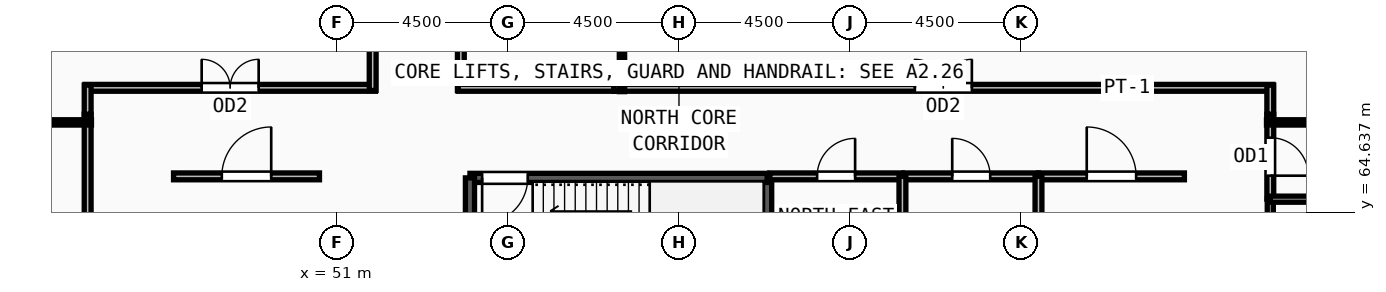
"""IFC4 building model, lengths in metres.
Left out: names, types, materials, properties, quantities, classifications, styles, units other than length and angle.
Written with IfcOpenShell. Run it as: python <this file> out.ifc"""

import sys

from ifc_helpers import new_model, si_unit, direction, frame, frame_2d, origin, place, context, subcontext, project, spatial, rectangle, extrude, source, transform, mapped, element, fill, save


model = new_model("IFC4")
c1 = context("Model", 3, precision=1e-05, world=origin(), true_north=direction((0.0, 1.0)))
c2 = subcontext(c1, "Body", "Model", "MODEL_VIEW")
j1 = project(units=[si_unit("LENGTHUNIT", "METRE"), si_unit("PLANEANGLEUNIT", "RADIAN")], contexts=[c1])
p1 = place(None, origin())
s1 = spatial("IfcSite", under=j1, at=p1, CompositionType="ELEMENT")
p2 = place(p1, origin())
s2 = spatial("IfcBuilding", under=s1, at=p2, CompositionType="ELEMENT")
p3 = place(p2, frame((0.0, 0.0, 339.75)))
s3 = spatial("IfcBuildingStorey", under=s2, at=p3, CompositionType="ELEMENT", Elevation=339.75)
p4 = place(p3, frame((62.32, 62.1, 0.0), z_axis=(0.0, 0.0, 1.0), x_axis=(0.0, 1.0, 0.0)))
e1 = element("IfcWall", 1, at=p4, inside=s3, PredefinedType="SOLIDWALL", context=c2, shape_type="SweptSolid", body=[
    extrude(rectangle(XDim=3.44, YDim=0.24, at=frame_2d((1.72, 0.0))), origin(), (0.0, 0.0, 1.0), 3.57),
])
p5 = place(p3, frame((62.32, 65.54, 0.0), z_axis=(0.0, 0.0, 1.0), x_axis=(-1.0, 0.0, 0.0)))
e2 = element("IfcWall", 2, at=p5, inside=s3, PredefinedType="SOLIDWALL", context=c2, shape_type="SweptSolid", body=[
    extrude(rectangle(XDim=7.82, YDim=0.24, at=frame_2d((3.91, 0.0))), origin(), (0.0, 0.0, 1.0), 3.57),
])
m1 = source(origin(), c2, "Body", "SweptSolid", [
    extrude(rectangle(XDim=1.2, YDim=2.2, at=frame_2d((0.6, 1.1))), frame((0.0, 0.13, 0.0), z_axis=(0.0, -1.0, 0.0), x_axis=(1.0, 0.0, 0.0)), (0.0, 0.0, 1.0), 0.26),
])
p6 = place(p5, frame((6.3, 0.0, 0.0)))
e3 = element("IfcOpeningElement", 3, at=p6, cuts=e2, PredefinedType="OPENING", context=c2, shape_type="MappedRepresentation", body=[
    mapped(m1, transform((0.0, 0.0, 0.0), x_axis=(1.0, 0.0, 0.0), y_axis=(0.0, 1.0, 0.0), z_axis=(0.0, 0.0, 1.0), scale=1.0)),
])
p7 = place(p3, frame((54.5, 65.54, 0.0), z_axis=(0.0, 0.0, 1.0), x_axis=(0.0, -1.0, 0.0)))
e4 = element("IfcWall", 4, at=p7, inside=s3, PredefinedType="SOLIDWALL", context=c2, shape_type="SweptSolid", body=[
    extrude(rectangle(XDim=3.44, YDim=0.24, at=frame_2d((1.72, 0.0))), origin(), (0.0, 0.0, 1.0), 3.57),
])
p8 = place(p3, frame((75.56, 62.24, 0.0), z_axis=(0.0, 0.0, 1.0), x_axis=(0.0, 1.0, 0.0)))
e5 = element("IfcWall", 5, at=p8, inside=s3, PredefinedType="PARTITIONING", context=c2, shape_type="SweptSolid", body=[
    extrude(rectangle(XDim=2.74, YDim=0.16, at=frame_2d((1.37, 0.0))), origin(), (0.0, 0.0, 1.0), 3.57),
])
m2 = source(origin(), c2, "Body", "SweptSolid", [
    extrude(rectangle(XDim=1.05, YDim=2.15, at=frame_2d((0.525, 1.075))), frame((0.0, 0.09, 0.0), z_axis=(0.0, -1.0, 0.0), x_axis=(1.0, 0.0, 0.0)), (0.0, 0.0, 1.0), 0.18),
])
p9 = place(p8, frame((0.845, 0.0, 0.0)))
e6 = element("IfcOpeningElement", 6, at=p9, cuts=e5, PredefinedType="OPENING", context=c2, shape_type="MappedRepresentation", body=[
    mapped(m2, transform((0.0, 0.0, 0.0), x_axis=(1.0, 0.0, 0.0), y_axis=(0.0, 1.0, 0.0), z_axis=(0.0, 0.0, 1.0), scale=1.0)),
])
p10 = place(p3, frame((62.39, 65.58, 0.0), z_axis=(0.0, 0.0, 1.0), x_axis=(1.0, 0.0, 0.0)))
e7 = element("IfcWall", 7, at=p10, inside=s3, PredefinedType="PARTITIONING", context=c2, shape_type="SweptSolid", body=[
    extrude(rectangle(XDim=3.49, YDim=0.18, at=frame_2d((1.745, 0.0))), origin(), (0.0, 0.0, 1.0), 3.57),
])
m3 = source(origin(), c2, "Body", "SweptSolid", [
    extrude(rectangle(XDim=1.0, YDim=2.2, at=frame_2d((0.5, 1.1))), frame((0.0, 0.1, 0.0), z_axis=(0.0, -1.0, 0.0), x_axis=(1.0, 0.0, 0.0)), (0.0, 0.0, 1.0), 0.2),
])
p11 = place(p10, frame((1.245, 0.0, 0.0)))
e8 = element("IfcOpeningElement", 8, at=p11, cuts=e7, PredefinedType="OPENING", context=c2, shape_type="MappedRepresentation", body=[
    mapped(m3, transform((0.0, 0.0, 0.0), x_axis=(1.0, 0.0, 0.0), y_axis=(0.0, 1.0, 0.0), z_axis=(0.0, 0.0, 1.0), scale=1.0)),
])
p12 = place(p3, frame((65.92, 65.58, 0.0), z_axis=(0.0, 0.0, 1.0), x_axis=(1.0, 0.0, 0.0)))
e9 = element("IfcWall", 9, at=p12, inside=s3, PredefinedType="PARTITIONING", context=c2, shape_type="SweptSolid", body=[
    extrude(rectangle(XDim=3.54, YDim=0.18, at=frame_2d((1.77, 0.0))), origin(), (0.0, 0.0, 1.0), 3.57),
])
p13 = place(p12, frame((1.27, 0.0, 0.0)))
e10 = element("IfcOpeningElement", 10, at=p13, cuts=e9, PredefinedType="OPENING", context=c2, shape_type="MappedRepresentation", body=[
    mapped(m3, transform((0.0, 0.0, 0.0), x_axis=(1.0, 0.0, 0.0), y_axis=(0.0, 1.0, 0.0), z_axis=(0.0, 0.0, 1.0), scale=1.0)),
])
p14 = place(p3, frame((46.7, 65.58, 0.0), z_axis=(0.0, 0.0, 1.0), x_axis=(1.0, 0.0, 0.0)))
e11 = element("IfcWall", 11, at=p14, inside=s3, PredefinedType="PARTITIONING", context=c2, shape_type="SweptSolid", body=[
    extrude(rectangle(XDim=3.84, YDim=0.18, at=frame_2d((1.92, 0.0))), origin(), (0.0, 0.0, 1.0), 3.57),
])
m4 = source(origin(), c2, "Body", "SweptSolid", [
    extrude(rectangle(XDim=1.3, YDim=2.2, at=frame_2d((0.65, 1.1))), frame((0.0, 0.1, 0.0), z_axis=(0.0, -1.0, 0.0), x_axis=(1.0, 0.0, 0.0)), (0.0, 0.0, 1.0), 0.2),
])
p15 = place(p14, frame((1.27, 0.0, 0.0)))
e12 = element("IfcOpeningElement", 12, at=p15, cuts=e11, PredefinedType="OPENING", context=c2, shape_type="MappedRepresentation", body=[
    mapped(m4, transform((0.0, 0.0, 0.0), x_axis=(1.0, 0.0, 0.0), y_axis=(0.0, 1.0, 0.0), z_axis=(0.0, 0.0, 1.0), scale=1.0)),
])
p16 = place(p3, frame((69.46, 65.58, 0.0), z_axis=(0.0, 0.0, 1.0), x_axis=(1.0, 0.0, 0.0)))
e13 = element("IfcWall", 13, at=p16, inside=s3, PredefinedType="PARTITIONING", context=c2, shape_type="SweptSolid", body=[
    extrude(rectangle(XDim=3.84, YDim=0.18, at=frame_2d((1.92, 0.0))), origin(), (0.0, 0.0, 1.0), 3.57),
])
p17 = place(p16, frame((1.27, 0.0, 0.0)))
e14 = element("IfcOpeningElement", 14, at=p17, cuts=e13, PredefinedType="OPENING", context=c2, shape_type="MappedRepresentation", body=[
    mapped(m4, transform((0.0, 0.0, 0.0), x_axis=(1.0, 0.0, 0.0), y_axis=(0.0, 1.0, 0.0), z_axis=(0.0, 0.0, 1.0), scale=1.0)),
])
p18 = place(p3, frame((75.56, 67.215, 0.0), z_axis=(0.0, 0.0, 1.0), x_axis=(0.0, -1.0, 0.0)))
e15 = element("IfcWall", 15, at=p18, inside=s3, PredefinedType="PARTITIONING", context=c2, shape_type="SweptSolid", body=[
    extrude(rectangle(XDim=2.235, YDim=0.18, at=frame_2d((1.118, 0.0))), origin(), (0.0, 0.0, 1.0), 3.57),
])
p19 = place(p18, frame((0.617, 0.0, 0.0)))
e16 = element("IfcOpeningElement", 16, at=p19, cuts=e15, PredefinedType="OPENING", context=c2, shape_type="MappedRepresentation", body=[
    mapped(m3, transform((0.0, 0.0, 0.0), x_axis=(1.0, 0.0, 0.0), y_axis=(0.0, 1.0, 0.0), z_axis=(0.0, 0.0, 1.0), scale=1.0)),
])
p20 = place(p3, frame((58.285, 67.91, 0.0), z_axis=(0.0, 0.0, 1.0), x_axis=(1.0, 0.0, 0.0)))
e17 = element("IfcWall", 17, at=p20, inside=s3, PredefinedType="PARTITIONING", context=c2, shape_type="SweptSolid", body=[
    extrude(rectangle(XDim=17.345, YDim=0.18, at=frame_2d((8.672, 0.0))), origin(), (0.0, 0.0, 1.0), 3.57),
])
m5 = source(origin(), c2, "Body", "SweptSolid", [
    extrude(rectangle(XDim=1.5, YDim=2.2, at=frame_2d((0.75, 1.1))), frame((0.0, 0.1, 0.0), z_axis=(0.0, -1.0, 0.0), x_axis=(1.0, 0.0, 0.0)), (0.0, 0.0, 1.0), 0.2),
])
p21 = place(p20, frame((7.922, 0.0, 0.0)))
e18 = element("IfcOpeningElement", 18, at=p21, cuts=e17, PredefinedType="OPENING", context=c2, shape_type="MappedRepresentation", body=[
    mapped(m5, transform((0.0, 0.0, 0.0), x_axis=(1.0, 0.0, 0.0), y_axis=(0.0, 1.0, 0.0), z_axis=(0.0, 0.0, 1.0), scale=1.0)),
])
p22 = place(p3, frame((54.26, 75.252, 0.0), z_axis=(0.0, 0.0, 1.0), x_axis=(0.0, -1.0, 0.0)))
e19 = element("IfcWall", 19, at=p22, inside=s3, PredefinedType="PARTITIONING", context=c2, shape_type="SweptSolid", body=[
    extrude(rectangle(XDim=7.412, YDim=0.18, at=frame_2d((3.706, 0.0))), origin(), (0.0, 0.0, 1.0), 3.57),
])
p23 = place(p22, frame((3.206, 0.0, 0.0)))
e20 = element("IfcOpeningElement", 20, at=p23, cuts=e19, PredefinedType="OPENING", context=c2, shape_type="MappedRepresentation", body=[
    mapped(m3, transform((0.0, 0.0, 0.0), x_axis=(1.0, 0.0, 0.0), y_axis=(0.0, 1.0, 0.0), z_axis=(0.0, 0.0, 1.0), scale=1.0)),
])
p24 = place(p3, frame((44.37, 67.91, 0.0), z_axis=(0.0, 0.0, 1.0), x_axis=(1.0, 0.0, 0.0)))
e21 = element("IfcWall", 21, at=p24, inside=s3, PredefinedType="PARTITIONING", context=c2, shape_type="SweptSolid", body=[
    extrude(rectangle(XDim=7.64, YDim=0.18, at=frame_2d((3.82, 0.0))), origin(), (0.0, 0.0, 1.0), 3.57),
])
p25 = place(p24, frame((3.07, 0.0, 0.0)))
e22 = element("IfcOpeningElement", 22, at=p25, cuts=e21, PredefinedType="OPENING", context=c2, shape_type="MappedRepresentation", body=[
    mapped(m5, transform((0.0, 0.0, 0.0), x_axis=(1.0, 0.0, 0.0), y_axis=(0.0, 1.0, 0.0), z_axis=(0.0, 0.0, 1.0), scale=1.0)),
])
p26 = place(p3, frame((44.44, 54.285, 0.0), z_axis=(0.0, 0.0, 1.0), x_axis=(0.0, 1.0, 0.0)))
e23 = element("IfcWall", 23, at=p26, inside=s3, PredefinedType="PARTITIONING", context=c2, shape_type="SweptSolid", body=[
    extrude(rectangle(XDim=12.93, YDim=0.18, at=frame_2d((6.465, 0.0))), origin(), (0.0, 0.0, 1.0), 3.261),
])
p27 = place(p26, frame((5.715, 0.0, 0.0)))
e24 = element("IfcOpeningElement", 24, at=p27, cuts=e23, PredefinedType="OPENING", context=c2, shape_type="MappedRepresentation", body=[
    mapped(m5, transform((0.0, 0.0, 0.0), x_axis=(1.0, 0.0, 0.0), y_axis=(0.0, 1.0, 0.0), z_axis=(0.0, 0.0, 1.0), scale=1.0)),
])
p28 = place(p3, frame((75.56, 64.98, 0.0), z_axis=(0.0, 0.0, 1.0), x_axis=(1.0, 0.0, 0.0)))
e25 = element("IfcWall", 25, at=p28, inside=s3, PredefinedType="PARTITIONING", context=c2, shape_type="SweptSolid", body=[
    extrude(rectangle(XDim=4.46, YDim=0.16, at=frame_2d((2.23, 0.0))), origin(), (0.0, 0.0, 1.0), 3.57),
])
p29 = place(p3, frame((65.88, 61.775, 0.0), z_axis=(0.0, 0.0, 1.0), x_axis=(0.0, 1.0, 0.0)))
e26 = element("IfcWall", 26, at=p29, inside=s3, PredefinedType="PARTITIONING", context=c2, shape_type="SweptSolid", body=[
    extrude(rectangle(XDim=3.805, YDim=0.18, at=frame_2d((1.903, 0.0))), origin(), (0.0, 0.0, 1.0), 3.57),
])
p30 = place(p3, frame((69.46, 61.95, 0.0), z_axis=(0.0, 0.0, 1.0), x_axis=(0.0, 1.0, 0.0)))
e27 = element("IfcWall", 27, at=p30, inside=s3, PredefinedType="PARTITIONING", context=c2, shape_type="SweptSolid", body=[
    extrude(rectangle(XDim=3.63, YDim=0.18, at=frame_2d((1.815, 0.0))), origin(), (0.0, 0.0, 1.0), 3.57),
])
p31 = place(p3, frame((75.56, 67.98, 0.0), z_axis=(0.0, 0.0, 1.0), x_axis=(0.0, -1.0, 0.0)))
e28 = element("IfcWall", 28, at=p31, inside=s3, PredefinedType="PARTITIONING", context=c2, shape_type="SweptSolid", body=[
    extrude(rectangle(XDim=0.765, YDim=0.18, at=frame_2d((0.382, 0.0))), origin(), (0.0, 0.0, 1.0), 3.57),
])
p32 = place(p3, frame((54.19, 67.91, 0.0), z_axis=(0.0, 0.0, 1.0), x_axis=(1.0, 0.0, 0.0)))
e29 = element("IfcWall", 29, at=p32, inside=s3, PredefinedType="PARTITIONING", context=c2, shape_type="SweptSolid", body=[
    extrude(rectangle(XDim=4.095, YDim=0.18, at=frame_2d((2.047, 0.0))), origin(), (0.0, 0.0, 1.0), 3.57),
])
p33 = place(p3, frame((51.94, 67.84, 0.0), z_axis=(0.0, 0.0, 1.0), x_axis=(0.0, 1.0, 0.0)))
e30 = element("IfcWall", 30, at=p33, inside=s3, PredefinedType="PARTITIONING", context=c2, shape_type="SweptSolid", body=[
    extrude(rectangle(XDim=7.251, YDim=0.18, at=frame_2d((3.625, 0.0))), origin(), (0.0, 0.0, 1.0), 3.57),
])
p34 = place(p3, frame((44.44, 67.215, 0.0), z_axis=(0.0, 0.0, 1.0), x_axis=(0.0, 1.0, 0.0)))
e31 = element("IfcWall", 31, at=p34, inside=s3, PredefinedType="PARTITIONING", context=c2, shape_type="SweptSolid", body=[
    extrude(rectangle(XDim=0.765, YDim=0.18, at=frame_2d((0.382, 0.0))), origin(), (0.0, 0.0, 1.0), 3.57),
])
for number, where, z_axis, x_axis in (
    (32, (44.54, 67.0, 0.0), (0.0, 0.0, 1.0), (-1.0, 0.0, 0.0)),
    (33, (75.46, 67.0, 0.0), (0.0, 0.0, 1.0), (1.0, 0.0, 0.0)),
):
    element("IfcWall", number, at=place(p3, frame(where, z_axis=z_axis, x_axis=x_axis)), inside=s3, PredefinedType="PARTITIONING", context=c2, shape_type="SweptSolid", body=[
        extrude(rectangle(XDim=12.715, YDim=0.14, at=frame_2d((6.357, 0.0))), origin(), (0.0, 0.0, 1.0), 3.57),
    ])
p35 = place(p3, frame((58.5, 67.81, 0.0), z_axis=(0.0, 0.0, 1.0), x_axis=(0.0, 1.0, 0.0)))
e34 = element("IfcWall", 34, at=p35, inside=s3, PredefinedType="PARTITIONING", context=c2, shape_type="SweptSolid", body=[
    extrude(rectangle(XDim=7.826, YDim=0.14, at=frame_2d((3.913, 0.0))), origin(), (0.0, 0.0, 1.0), 3.57),
])
m6 = source(origin(), c2, "Body", "SweptSolid", [
    extrude(rectangle(XDim=1.2, YDim=2.2, at=frame_2d((0.6, 1.1))), frame((0.0, 0.025, 0.0), z_axis=(0.0, -1.0, 0.0), x_axis=(1.0, 0.0, 0.0)), (0.0, 0.0, 1.0), 0.05),
])
p36 = place(p6, origin())
e35 = element("IfcDoor", 35, at=p36, inside=s3, OperationType="SINGLE_SWING_RIGHT", PredefinedType="DOOR", context=c2, shape_type="MappedRepresentation", body=[
    mapped(m6, transform((0.0, 0.0, 0.0), x_axis=(1.0, 0.0, 0.0), y_axis=(0.0, 1.0, 0.0), z_axis=(0.0, 0.0, 1.0), scale=1.0)),
])
fill(e3, e35)
m7 = source(origin(), c2, "Body", "SweptSolid", [
    extrude(rectangle(XDim=1.0, YDim=2.2, at=frame_2d((0.5, 1.1))), frame((0.0, 0.025, 0.0), z_axis=(0.0, -1.0, 0.0), x_axis=(1.0, 0.0, 0.0)), (0.0, 0.0, 1.0), 0.05),
])
p37 = place(p11, origin())
e36 = element("IfcDoor", 36, at=p37, inside=s3, OperationType="SINGLE_SWING_RIGHT", PredefinedType="DOOR", context=c2, shape_type="MappedRepresentation", body=[
    mapped(m7, transform((0.0, 0.0, 0.0), x_axis=(1.0, 0.0, 0.0), y_axis=(0.0, 1.0, 0.0), z_axis=(0.0, 0.0, 1.0), scale=1.0)),
])
fill(e8, e36)
p38 = place(p13, origin())
e37 = element("IfcDoor", 37, at=p38, inside=s3, OperationType="SINGLE_SWING_LEFT", PredefinedType="DOOR", context=c2, shape_type="MappedRepresentation", body=[
    mapped(m7, transform((0.0, 0.0, 0.0), x_axis=(1.0, 0.0, 0.0), y_axis=(0.0, 1.0, 0.0), z_axis=(0.0, 0.0, 1.0), scale=1.0)),
])
fill(e10, e37)
m8 = source(origin(), c2, "Body", "SweptSolid", [
    extrude(rectangle(XDim=1.3, YDim=2.2, at=frame_2d((0.65, 1.1))), frame((0.0, 0.025, 0.0), z_axis=(0.0, -1.0, 0.0), x_axis=(1.0, 0.0, 0.0)), (0.0, 0.0, 1.0), 0.05),
])
p39 = place(p15, origin())
e38 = element("IfcDoor", 38, at=p39, inside=s3, OperationType="SINGLE_SWING_RIGHT", PredefinedType="DOOR", context=c2, shape_type="MappedRepresentation", body=[
    mapped(m8, transform((0.0, 0.0, 0.0), x_axis=(1.0, 0.0, 0.0), y_axis=(0.0, 1.0, 0.0), z_axis=(0.0, 0.0, 1.0), scale=1.0)),
])
fill(e12, e38)
p40 = place(p17, origin())
e39 = element("IfcDoor", 39, at=p40, inside=s3, OperationType="SINGLE_SWING_LEFT", PredefinedType="DOOR", context=c2, shape_type="MappedRepresentation", body=[
    mapped(m8, transform((0.0, 0.0, 0.0), x_axis=(1.0, 0.0, 0.0), y_axis=(0.0, 1.0, 0.0), z_axis=(0.0, 0.0, 1.0), scale=1.0)),
])
fill(e14, e39)
p41 = place(p19, origin())
e40 = element("IfcDoor", 40, at=p41, inside=s3, OperationType="SINGLE_SWING_RIGHT", PredefinedType="DOOR", context=c2, shape_type="MappedRepresentation", body=[
    mapped(m7, transform((0.0, 0.0, 0.0), x_axis=(1.0, 0.0, 0.0), y_axis=(0.0, 1.0, 0.0), z_axis=(0.0, 0.0, 1.0), scale=1.0)),
])
fill(e16, e40)
m9 = source(origin(), c2, "Body", "SweptSolid", [
    extrude(rectangle(XDim=1.5, YDim=2.2, at=frame_2d((0.75, 1.1))), frame((0.0, 0.025, 0.0), z_axis=(0.0, -1.0, 0.0), x_axis=(1.0, 0.0, 0.0)), (0.0, 0.0, 1.0), 0.05),
])
p42 = place(p21, origin())
e41 = element("IfcDoor", 41, at=p42, inside=s3, OperationType="DOUBLE_DOOR_SINGLE_SWING", PredefinedType="DOOR", context=c2, shape_type="MappedRepresentation", body=[
    mapped(m9, transform((0.0, 0.0, 0.0), x_axis=(1.0, 0.0, 0.0), y_axis=(0.0, 1.0, 0.0), z_axis=(0.0, 0.0, 1.0), scale=1.0)),
])
fill(e18, e41)
p43 = place(p25, origin())
e42 = element("IfcDoor", 42, at=p43, inside=s3, OperationType="DOUBLE_DOOR_SINGLE_SWING", PredefinedType="DOOR", context=c2, shape_type="MappedRepresentation", body=[
    mapped(m9, transform((0.0, 0.0, 0.0), x_axis=(1.0, 0.0, 0.0), y_axis=(0.0, 1.0, 0.0), z_axis=(0.0, 0.0, 1.0), scale=1.0)),
])
fill(e22, e42)
save(model, sys.argv[1])
